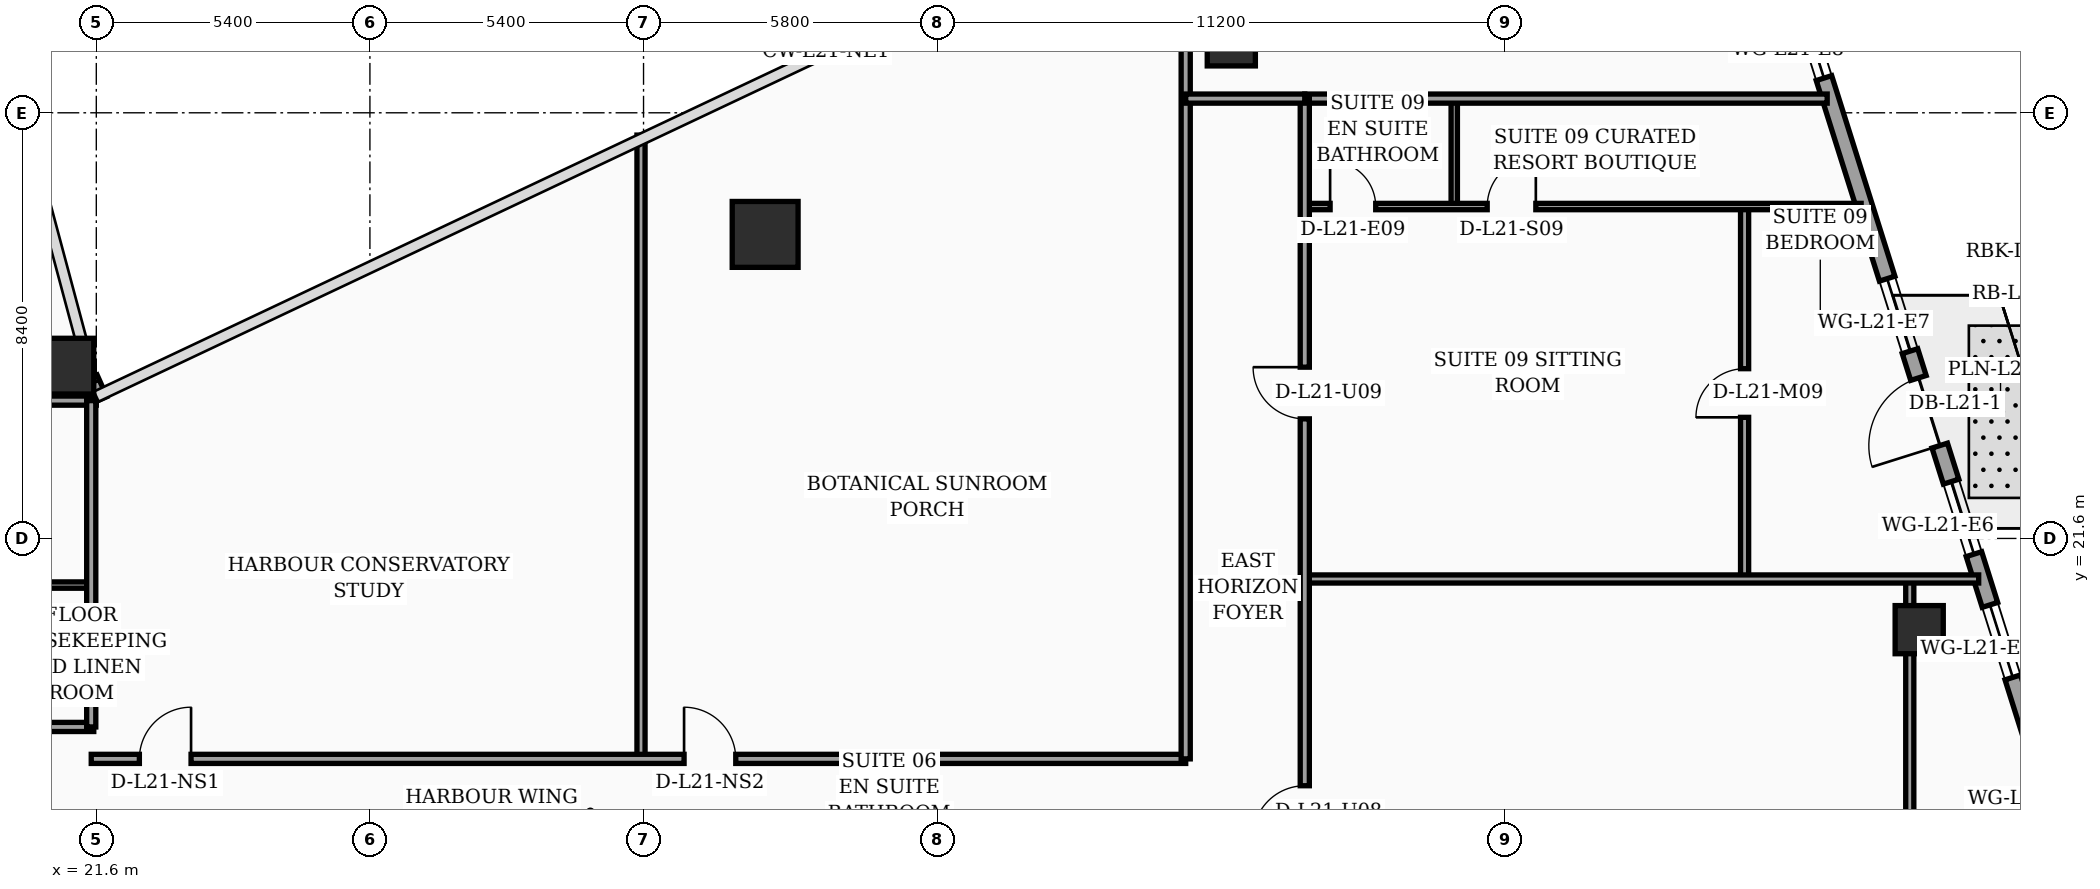
"""IFC4 building model, lengths in metres.
Left out: names, types, materials, properties, quantities, classifications, styles, units other than length and angle.
Written with IfcOpenShell. Run it as: python <this file> out.ifc"""

import sys

from ifc_helpers import new_model, si_unit, direction, frame, frame_2d, origin, origin_2d, place, context, subcontext, project, spatial, rectangle, hollow_rectangle, circle, extrude, element, fill, save


model = new_model("IFC4")
c1 = context("Model", 3, precision=1e-05, world=origin(), true_north=direction((0.0, 1.0)))
c2 = subcontext(c1, "Body", "Model", "MODEL_VIEW")
j1 = project(units=[si_unit("LENGTHUNIT", "METRE"), si_unit("PLANEANGLEUNIT", "RADIAN")], contexts=[c1])
p1 = place(None, origin())
s1 = spatial("IfcSite", under=j1, at=p1, CompositionType="ELEMENT")
p2 = place(p1, origin())
s2 = spatial("IfcBuilding", under=s1, at=p2, CompositionType="ELEMENT")
p3 = place(p2, frame((0.0, 0.0, 88.8)))
s3 = spatial("IfcBuildingStorey", under=s2, at=p3, CompositionType="ELEMENT", Elevation=88.8)
p4 = place(p3, frame((21.0, 25.0, 0.0), z_axis=(0.0, 0.0, 1.0), x_axis=(1.0, 0.0, 0.0)))
e1 = element("IfcColumn", 1, at=p4, inside=s3, PredefinedType="COLUMN", context=c2, shape_type="SweptSolid", body=[
    extrude(hollow_rectangle(XDim=1.1, YDim=1.1, WallThickness=0.045, at=origin_2d()), origin(), (0.0, 0.0, 1.0), 3.52),
])
p5 = place(p3, frame((34.8, 27.6, 0.0), z_axis=(0.0, 0.0, 1.0), x_axis=(1.0, 0.0, 0.0)))
e2 = element("IfcColumn", 2, at=p5, inside=s3, PredefinedType="COLUMN", context=c2, shape_type="SweptSolid", body=[
    extrude(circle(Radius=0.65, at=origin_2d()), origin(), (0.0, 0.0, 1.0), 3.52),
])
for number, where, z_axis, x_axis in (
    (3, (44.0, 31.4, 0.0), (0.0, 0.0, 1.0), (1.0, 0.0, 0.0)),
    (4, (57.576, 19.8, 0.0), (0.0, 0.0, 1.0), (1.0, 0.0, 0.0)),
):
    element("IfcColumn", number, at=place(p3, frame(where, z_axis=z_axis, x_axis=x_axis)), inside=s3, PredefinedType="COLUMN", context=c2, shape_type="SweptSolid", body=[
        extrude(hollow_rectangle(XDim=0.95, YDim=0.95, WallThickness=0.04, at=origin_2d()), origin(), (0.0, 0.0, 1.0), 3.52),
    ])
p6 = place(p3, frame((21.68, 24.34, 0.0), z_axis=(0.0, 0.0, 1.0), x_axis=(-0.40758134973, 0.913168901875, 0.0)))
e5 = element("IfcWall", 5, at=p6, inside=s3, PredefinedType="SOLIDWALL", context=c2, shape_type="SweptSolid", body=[
    extrude(rectangle(XDim=0.471, YDim=0.28, at=frame_2d((0.235, 0.0))), origin(), (0.0, 0.0, 1.0), 3.52),
])
p7 = place(p3, frame((63.63, 5.505, 0.0), z_axis=(0.0, 0.0, 1.0), x_axis=(-0.300501856448, 0.953781229775, 0.0)))
e6 = element("IfcWall", 6, at=p7, inside=s3, PredefinedType="SOLIDWALL", context=c2, shape_type="SweptSolid", body=[
    extrude(rectangle(XDim=30.814, YDim=0.32, at=frame_2d((15.407, 0.0))), origin(), (0.0, 0.0, 1.0), 3.52),
])
p8 = place(p7, frame((18.796, 0.0, 0.0)))
e7 = element("IfcOpeningElement", 7, at=p8, cuts=e6, PredefinedType="OPENING", context=c2, shape_type="SweptSolid", body=[
    extrude(rectangle(XDim=1.4, YDim=2.25, at=frame_2d((0.7, 1.125))), frame((0.0, 0.17, 0.0), z_axis=(0.0, -1.0, 0.0), x_axis=(1.0, 0.0, 0.0)), (0.0, 0.0, 1.0), 0.34),
])
p9 = place(p7, frame((2.65, 0.0, 0.75)))
e8 = element("IfcOpeningElement", 8, at=p9, cuts=e6, PredefinedType="OPENING", context=c2, shape_type="SweptSolid", body=[
    extrude(rectangle(XDim=1.5, YDim=1.6, at=frame_2d((0.75, 0.8))), frame((0.0, 0.17, 0.0), z_axis=(0.0, -1.0, 0.0), x_axis=(1.0, 0.0, 0.0)), (0.0, 0.0, 1.0), 0.34),
])
p10 = place(p7, frame((4.7, 0.0, 0.75)))
e9 = element("IfcOpeningElement", 9, at=p10, cuts=e6, PredefinedType="OPENING", context=c2, shape_type="SweptSolid", body=[
    extrude(rectangle(XDim=1.5, YDim=1.6, at=frame_2d((0.75, 0.8))), frame((0.0, 0.17, 0.0), z_axis=(0.0, -1.0, 0.0), x_axis=(1.0, 0.0, 0.0)), (0.0, 0.0, 1.0), 0.34),
])
p11 = place(p7, frame((7.8, 0.0, 0.75)))
e10 = element("IfcOpeningElement", 10, at=p11, cuts=e6, PredefinedType="OPENING", context=c2, shape_type="SweptSolid", body=[
    extrude(rectangle(XDim=1.5, YDim=1.6, at=frame_2d((0.75, 0.8))), frame((0.0, 0.17, 0.0), z_axis=(0.0, -1.0, 0.0), x_axis=(1.0, 0.0, 0.0)), (0.0, 0.0, 1.0), 0.34),
])
p12 = place(p7, frame((10.9, 0.0, 0.75)))
e11 = element("IfcOpeningElement", 11, at=p12, cuts=e6, PredefinedType="OPENING", context=c2, shape_type="SweptSolid", body=[
    extrude(rectangle(XDim=1.5, YDim=1.6, at=frame_2d((0.75, 0.8))), frame((0.0, 0.17, 0.0), z_axis=(0.0, -1.0, 0.0), x_axis=(1.0, 0.0, 0.0)), (0.0, 0.0, 1.0), 0.34),
])
p13 = place(p7, frame((14.0, 0.0, 0.75)))
e12 = element("IfcOpeningElement", 12, at=p13, cuts=e6, PredefinedType="OPENING", context=c2, shape_type="SweptSolid", body=[
    extrude(rectangle(XDim=1.5, YDim=1.6, at=frame_2d((0.75, 0.8))), frame((0.0, 0.17, 0.0), z_axis=(0.0, -1.0, 0.0), x_axis=(1.0, 0.0, 0.0)), (0.0, 0.0, 1.0), 0.34),
])
p14 = place(p7, frame((16.55, 0.0, 0.75)))
e13 = element("IfcOpeningElement", 13, at=p14, cuts=e6, PredefinedType="OPENING", context=c2, shape_type="SweptSolid", body=[
    extrude(rectangle(XDim=1.5, YDim=1.6, at=frame_2d((0.75, 0.8))), frame((0.0, 0.17, 0.0), z_axis=(0.0, -1.0, 0.0), x_axis=(1.0, 0.0, 0.0)), (0.0, 0.0, 1.0), 0.34),
])
p15 = place(p7, frame((20.75, 0.0, 0.75)))
e14 = element("IfcOpeningElement", 14, at=p15, cuts=e6, PredefinedType="OPENING", context=c2, shape_type="SweptSolid", body=[
    extrude(rectangle(XDim=1.5, YDim=1.6, at=frame_2d((0.75, 0.8))), frame((0.0, 0.17, 0.0), z_axis=(0.0, -1.0, 0.0), x_axis=(1.0, 0.0, 0.0)), (0.0, 0.0, 1.0), 0.34),
])
p16 = place(p7, frame((26.4, 0.0, 0.75)))
e15 = element("IfcOpeningElement", 15, at=p16, cuts=e6, PredefinedType="OPENING", context=c2, shape_type="SweptSolid", body=[
    extrude(rectangle(XDim=1.5, YDim=1.6, at=frame_2d((0.75, 0.8))), frame((0.0, 0.17, 0.0), z_axis=(0.0, -1.0, 0.0), x_axis=(1.0, 0.0, 0.0)), (0.0, 0.0, 1.0), 0.34),
])
p17 = place(p3, frame((17.25, 17.88, 0.0), z_axis=(0.0, 0.0, 1.0), x_axis=(1.0, 0.0, 0.0)))
e16 = element("IfcWall", 16, at=p17, inside=s3, PredefinedType="PARTITIONING", context=c2, shape_type="SweptSolid", body=[
    extrude(rectangle(XDim=4.3, YDim=0.18, at=frame_2d((2.15, 0.0))), origin(), (0.0, 0.0, 1.0), 3.52),
])
p18 = place(p3, frame((17.25, 20.68, 0.0), z_axis=(0.0, 0.0, 1.0), x_axis=(1.0, 0.0, 0.0)))
e17 = element("IfcWall", 17, at=p18, inside=s3, PredefinedType="PARTITIONING", context=c2, shape_type="SweptSolid", body=[
    extrude(rectangle(XDim=4.3, YDim=0.125, at=frame_2d((2.15, 0.0))), origin(), (0.0, 0.0, 1.0), 3.52),
])
p19 = place(p3, frame((17.25, 24.32, 0.0), z_axis=(0.0, 0.0, 1.0), x_axis=(1.0, 0.0, 0.0)))
e18 = element("IfcWall", 18, at=p19, inside=s3, PredefinedType="PARTITIONING", context=c2, shape_type="SweptSolid", body=[
    extrude(rectangle(XDim=4.35, YDim=0.18, at=frame_2d((2.175, 0.0))), origin(), (0.0, 0.0, 1.0), 3.52),
])
p20 = place(p3, frame((21.5, 17.88, 0.0), z_axis=(0.0, 0.0, 1.0), x_axis=(0.0, 1.0, 0.0)))
e19 = element("IfcWall", 19, at=p20, inside=s3, PredefinedType="PARTITIONING", context=c2, shape_type="SweptSolid", body=[
    extrude(rectangle(XDim=6.44, YDim=0.18, at=frame_2d((3.22, 0.0))), origin(), (0.0, 0.0, 1.0), 3.52),
])
p21 = place(p3, frame((32.35, 17.25, 0.0), z_axis=(0.0, 0.0, 1.0), x_axis=(0.0, 1.0, 0.0)))
e20 = element("IfcWall", 20, at=p21, inside=s3, PredefinedType="PARTITIONING", context=c2, shape_type="SweptSolid", body=[
    extrude(rectangle(XDim=12.31, YDim=0.16, at=frame_2d((6.155, 0.0))), origin(), (0.0, 0.0, 1.0), 2.82),
])
p22 = place(p3, frame((21.5, 17.25, 0.0), z_axis=(0.0, 0.0, 1.0), x_axis=(1.0, 0.0, 0.0)))
e21 = element("IfcWall", 21, at=p22, inside=s3, PredefinedType="PARTITIONING", context=c2, shape_type="SweptSolid", body=[
    extrude(rectangle(XDim=21.6, YDim=0.18, at=frame_2d((10.8, 0.0))), origin(), (0.0, 0.0, 1.0), 2.82),
])
p23 = place(p22, frame((0.95, 0.0, 0.0)))
e22 = element("IfcOpeningElement", 22, at=p23, cuts=e21, PredefinedType="OPENING", context=c2, shape_type="SweptSolid", body=[
    extrude(rectangle(XDim=1.02, YDim=2.2, at=frame_2d((0.51, 1.1))), frame((0.0, 0.1, 0.0), z_axis=(0.0, -1.0, 0.0), x_axis=(1.0, 0.0, 0.0)), (0.0, 0.0, 1.0), 0.2),
])
p24 = place(p22, frame((11.7, 0.0, 0.0)))
e23 = element("IfcOpeningElement", 23, at=p24, cuts=e21, PredefinedType="OPENING", context=c2, shape_type="SweptSolid", body=[
    extrude(rectangle(XDim=1.02, YDim=2.2, at=frame_2d((0.51, 1.1))), frame((0.0, 0.1, 0.0), z_axis=(0.0, -1.0, 0.0), x_axis=(1.0, 0.0, 0.0)), (0.0, 0.0, 1.0), 0.2),
])
p25 = place(p3, frame((43.1, 17.25, 0.0), z_axis=(0.0, 0.0, 1.0), x_axis=(0.0, 1.0, 0.0)))
e24 = element("IfcWall", 24, at=p25, inside=s3, PredefinedType="PARTITIONING", context=c2, shape_type="SweptSolid", body=[
    extrude(rectangle(XDim=17.38, YDim=0.18, at=frame_2d((8.69, 0.0))), origin(), (0.0, 0.0, 1.0), 2.82),
])
p26 = place(p3, frame((57.39, 7.45, 0.0), z_axis=(0.0, 0.0, 1.0), x_axis=(0.0, 1.0, 0.0)))
e25 = element("IfcWall", 25, at=p26, inside=s3, PredefinedType="PARTITIONING", context=c2, shape_type="SweptSolid", body=[
    extrude(rectangle(XDim=13.35, YDim=0.16, at=frame_2d((6.675, 0.0))), origin(), (0.0, 0.0, 1.0), 2.82),
])
p27 = place(p26, frame((6.2, 0.0, 0.0)))
e26 = element("IfcOpeningElement", 26, at=p27, cuts=e25, PredefinedType="OPENING", context=c2, shape_type="SweptSolid", body=[
    extrude(rectangle(XDim=0.96, YDim=2.2, at=frame_2d((0.48, 1.1))), frame((0.0, 0.09, 0.0), z_axis=(0.0, -1.0, 0.0), x_axis=(1.0, 0.0, 0.0)), (0.0, 0.0, 1.0), 0.18),
])
p28 = place(p3, frame((48.4, 28.15, 0.0), z_axis=(0.0, 0.0, 1.0), x_axis=(0.0, 1.0, 0.0)))
e27 = element("IfcWall", 27, at=p28, inside=s3, PredefinedType="PARTITIONING", context=c2, shape_type="SweptSolid", body=[
    extrude(rectangle(XDim=2.13, YDim=0.125, at=frame_2d((1.065, 0.0))), origin(), (0.0, 0.0, 1.0), 2.82),
])
p29 = place(p3, frame((54.13, 20.8, 0.0), z_axis=(0.0, 0.0, 1.0), x_axis=(0.0, 1.0, 0.0)))
e28 = element("IfcWall", 28, at=p29, inside=s3, PredefinedType="PARTITIONING", context=c2, shape_type="SweptSolid", body=[
    extrude(rectangle(XDim=7.35, YDim=0.16, at=frame_2d((3.675, 0.0))), origin(), (0.0, 0.0, 1.0), 3.17),
])
p30 = place(p29, frame((3.19, 0.0, 0.0)))
e29 = element("IfcOpeningElement", 29, at=p30, cuts=e28, PredefinedType="OPENING", context=c2, shape_type="SweptSolid", body=[
    extrude(rectangle(XDim=0.96, YDim=2.2, at=frame_2d((0.48, 1.1))), frame((0.0, 0.09, 0.0), z_axis=(0.0, -1.0, 0.0), x_axis=(1.0, 0.0, 0.0)), (0.0, 0.0, 1.0), 0.18),
])
p31 = place(p3, frame((45.45, 28.15, 0.0), z_axis=(0.0, 0.0, 1.0), x_axis=(1.0, 0.0, 0.0)))
e30 = element("IfcWall", 30, at=p31, inside=s3, PredefinedType="PARTITIONING", context=c2, shape_type="SweptSolid", body=[
    extrude(rectangle(XDim=10.98, YDim=0.125, at=frame_2d((5.49, 0.0))), origin(), (0.0, 0.0, 1.0), 2.82),
])
p32 = place(p31, frame((0.5, 0.0, 0.0)))
e31 = element("IfcOpeningElement", 31, at=p32, cuts=e30, PredefinedType="OPENING", context=c2, shape_type="SweptSolid", body=[
    extrude(rectangle(XDim=0.9, YDim=2.15, at=frame_2d((0.45, 1.075))), frame((0.0, 0.073, 0.0), z_axis=(0.0, -1.0, 0.0), x_axis=(1.0, 0.0, 0.0)), (0.0, 0.0, 1.0), 0.145),
])
p33 = place(p31, frame((3.6, 0.0, 0.0)))
e32 = element("IfcOpeningElement", 32, at=p33, cuts=e30, PredefinedType="OPENING", context=c2, shape_type="SweptSolid", body=[
    extrude(rectangle(XDim=0.96, YDim=2.2, at=frame_2d((0.48, 1.1))), frame((0.0, 0.073, 0.0), z_axis=(0.0, -1.0, 0.0), x_axis=(1.0, 0.0, 0.0)), (0.0, 0.0, 1.0), 0.145),
])
p34 = place(p3, frame((45.45, 20.8, 0.0), z_axis=(0.0, 0.0, 1.0), x_axis=(1.0, 0.0, 0.0)))
e33 = element("IfcWall", 33, at=p34, inside=s3, PredefinedType="PARTITIONING", context=c2, shape_type="SweptSolid", body=[
    extrude(rectangle(XDim=13.3, YDim=0.16, at=frame_2d((6.65, 0.0))), origin(), (0.0, 0.0, 1.0), 2.82),
])
p35 = place(p3, frame((45.45, 30.28, 0.0), z_axis=(0.0, 0.0, 1.0), x_axis=(1.0, 0.0, 0.0)))
e34 = element("IfcWall", 34, at=p35, inside=s3, PredefinedType="PARTITIONING", context=c2, shape_type="SweptSolid", body=[
    extrude(rectangle(XDim=10.31, YDim=0.18, at=frame_2d((5.155, 0.0))), origin(), (0.0, 0.0, 1.0), 2.82),
])
p36 = place(p3, frame((45.45, 2.44, 0.0), z_axis=(0.0, 0.0, 1.0), x_axis=(0.0, 1.0, 0.0)))
e35 = element("IfcWall", 35, at=p36, inside=s3, PredefinedType="PARTITIONING", context=c2, shape_type="SweptSolid", body=[
    extrude(rectangle(XDim=27.84, YDim=0.18, at=frame_2d((13.92, 0.0))), origin(), (0.0, 0.0, 1.0), 2.82),
])
p37 = place(p36, frame((13.26, 0.0, 0.0)))
e36 = element("IfcOpeningElement", 36, at=p37, cuts=e35, PredefinedType="OPENING", context=c2, shape_type="SweptSolid", body=[
    extrude(rectangle(XDim=1.02, YDim=2.2, at=frame_2d((0.51, 1.1))), frame((0.0, 0.1, 0.0), z_axis=(0.0, -1.0, 0.0), x_axis=(1.0, 0.0, 0.0)), (0.0, 0.0, 1.0), 0.2),
])
p38 = place(p36, frame((21.52, 0.0, 0.0)))
e37 = element("IfcOpeningElement", 37, at=p38, cuts=e35, PredefinedType="OPENING", context=c2, shape_type="SweptSolid", body=[
    extrude(rectangle(XDim=1.02, YDim=2.2, at=frame_2d((0.51, 1.1))), frame((0.0, 0.1, 0.0), z_axis=(0.0, -1.0, 0.0), x_axis=(1.0, 0.0, 0.0)), (0.0, 0.0, 1.0), 0.2),
])
p39 = place(p3, frame((43.1, 30.28, 0.0), z_axis=(0.0, 0.0, 1.0), x_axis=(1.0, 0.0, 0.0)))
e38 = element("IfcWall", 38, at=p39, inside=s3, PredefinedType="PARTITIONING", context=c2, shape_type="SweptSolid", body=[
    extrude(rectangle(XDim=2.35, YDim=0.18, at=frame_2d((1.175, 0.0))), origin(), (0.0, 0.0, 1.0), 2.82),
])
p40 = place(p8, origin())
e39 = element("IfcDoor", 39, at=p40, inside=s3, OperationType="SINGLE_SWING_LEFT", PredefinedType="DOOR", context=c2, shape_type="SweptSolid", body=[
    extrude(rectangle(XDim=1.4, YDim=2.25, at=frame_2d((0.7, 1.125))), frame((0.0, 0.025, 0.0), z_axis=(0.0, -1.0, 0.0), x_axis=(1.0, 0.0, 0.0)), (0.0, 0.0, 1.0), 0.05),
])
fill(e7, e39)
p41 = place(p13, origin())
e40 = element("IfcWindow", 40, at=p41, inside=s3, PartitioningType="SINGLE_PANEL", PredefinedType="WINDOW", context=c2, shape_type="SweptSolid", body=[
    extrude(rectangle(XDim=1.5, YDim=1.6, at=frame_2d((0.75, 0.8))), frame((0.0, 0.03, 0.0), z_axis=(0.0, -1.0, 0.0), x_axis=(1.0, 0.0, 0.0)), (0.0, 0.0, 1.0), 0.06),
])
fill(e12, e40)
p42 = place(p14, origin())
e41 = element("IfcWindow", 41, at=p42, inside=s3, PartitioningType="SINGLE_PANEL", PredefinedType="WINDOW", context=c2, shape_type="SweptSolid", body=[
    extrude(rectangle(XDim=1.5, YDim=1.6, at=frame_2d((0.75, 0.8))), frame((0.0, 0.03, 0.0), z_axis=(0.0, -1.0, 0.0), x_axis=(1.0, 0.0, 0.0)), (0.0, 0.0, 1.0), 0.06),
])
fill(e13, e41)
p43 = place(p15, origin())
e42 = element("IfcWindow", 42, at=p43, inside=s3, PartitioningType="SINGLE_PANEL", PredefinedType="WINDOW", context=c2, shape_type="SweptSolid", body=[
    extrude(rectangle(XDim=1.5, YDim=1.6, at=frame_2d((0.75, 0.8))), frame((0.0, 0.03, 0.0), z_axis=(0.0, -1.0, 0.0), x_axis=(1.0, 0.0, 0.0)), (0.0, 0.0, 1.0), 0.06),
])
fill(e14, e42)
p44 = place(p16, origin())
e43 = element("IfcWindow", 43, at=p44, inside=s3, PartitioningType="SINGLE_PANEL", PredefinedType="WINDOW", context=c2, shape_type="SweptSolid", body=[
    extrude(rectangle(XDim=1.5, YDim=1.6, at=frame_2d((0.75, 0.8))), frame((0.0, 0.03, 0.0), z_axis=(0.0, -1.0, 0.0), x_axis=(1.0, 0.0, 0.0)), (0.0, 0.0, 1.0), 0.06),
])
fill(e15, e43)
p45 = place(p23, origin())
e44 = element("IfcDoor", 44, at=p45, inside=s3, OperationType="SINGLE_SWING_RIGHT", PredefinedType="DOOR", context=c2, shape_type="SweptSolid", body=[
    extrude(rectangle(XDim=1.02, YDim=2.2, at=frame_2d((0.51, 1.1))), frame((0.0, 0.025, 0.0), z_axis=(0.0, -1.0, 0.0), x_axis=(1.0, 0.0, 0.0)), (0.0, 0.0, 1.0), 0.05),
])
fill(e22, e44)
p46 = place(p24, origin())
e45 = element("IfcDoor", 45, at=p46, inside=s3, OperationType="SINGLE_SWING_LEFT", PredefinedType="DOOR", context=c2, shape_type="SweptSolid", body=[
    extrude(rectangle(XDim=1.02, YDim=2.2, at=frame_2d((0.51, 1.1))), frame((0.0, 0.025, 0.0), z_axis=(0.0, -1.0, 0.0), x_axis=(1.0, 0.0, 0.0)), (0.0, 0.0, 1.0), 0.05),
])
fill(e23, e45)
p47 = place(p30, origin())
e46 = element("IfcDoor", 46, at=p47, inside=s3, OperationType="SINGLE_SWING_LEFT", PredefinedType="DOOR", context=c2, shape_type="SweptSolid", body=[
    extrude(rectangle(XDim=0.96, YDim=2.2, at=frame_2d((0.48, 1.1))), frame((0.0, 0.025, 0.0), z_axis=(0.0, -1.0, 0.0), x_axis=(1.0, 0.0, 0.0)), (0.0, 0.0, 1.0), 0.05),
])
fill(e29, e46)
p48 = place(p32, origin())
e47 = element("IfcDoor", 47, at=p48, inside=s3, OperationType="SINGLE_SWING_LEFT", PredefinedType="DOOR", context=c2, shape_type="SweptSolid", body=[
    extrude(rectangle(XDim=0.9, YDim=2.15, at=frame_2d((0.45, 1.075))), frame((0.0, 0.025, 0.0), z_axis=(0.0, -1.0, 0.0), x_axis=(1.0, 0.0, 0.0)), (0.0, 0.0, 1.0), 0.05),
])
fill(e31, e47)
p49 = place(p33, origin())
e48 = element("IfcDoor", 48, at=p49, inside=s3, OperationType="SINGLE_SWING_RIGHT", PredefinedType="DOOR", context=c2, shape_type="SweptSolid", body=[
    extrude(rectangle(XDim=0.96, YDim=2.2, at=frame_2d((0.48, 1.1))), frame((0.0, 0.025, 0.0), z_axis=(0.0, -1.0, 0.0), x_axis=(1.0, 0.0, 0.0)), (0.0, 0.0, 1.0), 0.05),
])
fill(e32, e48)
p50 = place(p37, origin())
e49 = element("IfcDoor", 49, at=p50, inside=s3, OperationType="SINGLE_SWING_LEFT", PredefinedType="DOOR", context=c2, shape_type="SweptSolid", body=[
    extrude(rectangle(XDim=1.02, YDim=2.2, at=frame_2d((0.51, 1.1))), frame((0.0, 0.025, 0.0), z_axis=(0.0, -1.0, 0.0), x_axis=(1.0, 0.0, 0.0)), (0.0, 0.0, 1.0), 0.05),
])
fill(e36, e49)
p51 = place(p38, origin())
e50 = element("IfcDoor", 50, at=p51, inside=s3, OperationType="SINGLE_SWING_RIGHT", PredefinedType="DOOR", context=c2, shape_type="SweptSolid", body=[
    extrude(rectangle(XDim=1.02, YDim=2.2, at=frame_2d((0.51, 1.1))), frame((0.0, 0.025, 0.0), z_axis=(0.0, -1.0, 0.0), x_axis=(1.0, 0.0, 0.0)), (0.0, 0.0, 1.0), 0.05),
])
fill(e37, e50)
save(model, sys.argv[1])
